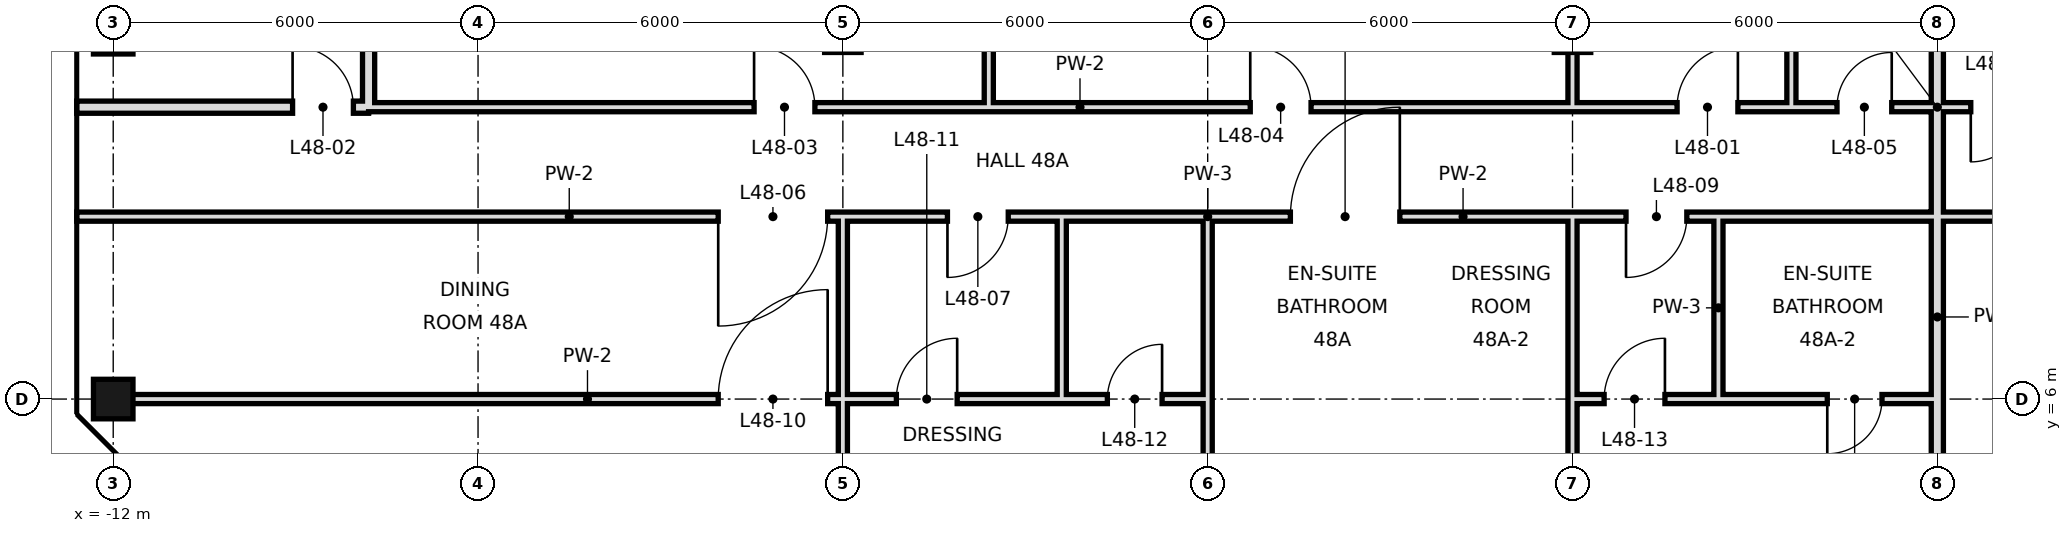
"""IFC4 building model, lengths in metres.
Left out: names, types, materials, properties, quantities, classifications, styles, units other than length and angle.
Written with IfcOpenShell. Run it as: python <this file> out.ifc"""

import sys

from ifc_helpers import new_model, si_unit, direction, frame, frame_2d, origin, origin_2d, place, context, subcontext, project, spatial, rectangle, hollow_rectangle, extrude, element, fill, save


model = new_model("IFC4")
c1 = context("Model", 3, precision=1e-05, world=origin(), true_north=direction((0.0, 1.0)))
c2 = subcontext(c1, "Body", "Model", "MODEL_VIEW")
j1 = project(units=[si_unit("LENGTHUNIT", "METRE"), si_unit("PLANEANGLEUNIT", "RADIAN")], contexts=[c1])
p1 = place(None, origin())
s1 = spatial("IfcSite", under=j1, at=p1, CompositionType="ELEMENT")
p2 = place(p1, origin())
s2 = spatial("IfcBuilding", under=s1, at=p2, CompositionType="ELEMENT")
p3 = place(p2, frame((0.0, 0.0, 206.4)))
s3 = spatial("IfcBuildingStorey", under=s2, at=p3, CompositionType="ELEMENT", Elevation=206.4)
for number, where, z_axis, x_axis in (
    (1, (-12.0, 6.0, 0.0), (0.0, 0.0, 1.0), (1.0, 0.0, 0.0)),
    (2, (-12.0, 12.0, 0.0), (0.0, 0.0, 1.0), (1.0, 0.0, 0.0)),
):
    element("IfcColumn", number, at=place(p3, frame(where, z_axis=z_axis, x_axis=x_axis)), inside=s3, PredefinedType="COLUMN", context=c2, shape_type="SweptSolid", body=[
        extrude(hollow_rectangle(XDim=0.65, YDim=0.65, WallThickness=0.032, at=origin_2d()), origin(), (0.0, 0.0, 1.0), 3.6),
    ])
p4 = place(p3, frame((-7.8, 10.8, 0.0), z_axis=(0.0, 0.0, 1.0), x_axis=(0.0, 1.0, 0.0)))
e3 = element("IfcWall", 3, at=p4, inside=s3, PredefinedType="SOLIDWALL", context=c2, shape_type="SweptSolid", body=[
    extrude(rectangle(XDim=7.2, YDim=0.2, at=frame_2d((3.6, 0.0))), origin(), (0.0, 0.0, 1.0), 2.68),
])
for number, where, z_axis, x_axis in (
    (4, (0.0, 0.0, 0.0), (0.0, 0.0, 1.0), (0.0, 1.0, 0.0)),
    (5, (12.0, 0.0, 0.0), (0.0, 0.0, 1.0), (0.0, 1.0, 0.0)),
):
    element("IfcWall", number, at=place(p3, frame(where, z_axis=z_axis, x_axis=x_axis)), inside=s3, PredefinedType="PARTITIONING", context=c2, shape_type="SweptSolid", body=[
        extrude(rectangle(XDim=9.0, YDim=0.15, at=frame_2d((4.5, 0.0))), origin(), (0.0, 0.0, 1.0), 2.68),
    ])
p5 = place(p3, frame((12.0, 10.8, 0.0), z_axis=(0.0, 0.0, 1.0), x_axis=(0.0, 1.0, 0.0)))
e6 = element("IfcWall", 6, at=p5, inside=s3, PredefinedType="PARTITIONING", context=c2, shape_type="SweptSolid", body=[
    extrude(rectangle(XDim=4.5, YDim=0.15, at=frame_2d((2.25, 0.0))), origin(), (0.0, 0.0, 1.0), 2.68),
])
p6 = place(p3, frame((14.4, 6.0, 0.0), z_axis=(0.0, 0.0, 1.0), x_axis=(0.0, 1.0, 0.0)))
e7 = element("IfcWall", 7, at=p6, inside=s3, PredefinedType="PARTITIONING", context=c2, shape_type="SweptSolid", body=[
    extrude(rectangle(XDim=3.0, YDim=0.15, at=frame_2d((1.5, 0.0))), origin(), (0.0, 0.0, 1.0), 3.38),
])
p7 = place(p3, frame((15.6, 10.8, 0.0), z_axis=(0.0, 0.0, 1.0), x_axis=(0.0, 1.0, 0.0)))
e8 = element("IfcWall", 8, at=p7, inside=s3, PredefinedType="PARTITIONING", context=c2, shape_type="SweptSolid", body=[
    extrude(rectangle(XDim=4.5, YDim=0.15, at=frame_2d((2.25, 0.0))), origin(), (0.0, 0.0, 1.0), 3.38),
])
p8 = place(p3, frame((18.0, -0.6, 0.0), z_axis=(0.0, 0.0, 1.0), x_axis=(0.0, 1.0, 0.0)))
e9 = element("IfcWall", 9, at=p8, inside=s3, PredefinedType="SOLIDWALL", context=c2, shape_type="SweptSolid", body=[
    extrude(rectangle(XDim=15.9, YDim=0.2, at=frame_2d((7.95, 0.0))), origin(), (0.0, 0.0, 1.0), 2.68),
])
p9 = place(p3, frame((2.4, 10.8, 0.0), z_axis=(0.0, 0.0, 1.0), x_axis=(0.0, 1.0, 0.0)))
e10 = element("IfcWall", 10, at=p9, inside=s3, PredefinedType="PARTITIONING", context=c2, shape_type="SweptSolid", body=[
    extrude(rectangle(XDim=7.2, YDim=0.15, at=frame_2d((3.6, 0.0))), origin(), (0.0, 0.0, 1.0), 3.38),
])
p10 = place(p3, frame((3.6, 6.0, 0.0), z_axis=(0.0, 0.0, 1.0), x_axis=(0.0, 1.0, 0.0)))
e11 = element("IfcWall", 11, at=p10, inside=s3, PredefinedType="PARTITIONING", context=c2, shape_type="SweptSolid", body=[
    extrude(rectangle(XDim=3.0, YDim=0.15, at=frame_2d((1.5, 0.0))), origin(), (0.0, 0.0, 1.0), 3.38),
])
p11 = place(p3, frame((6.0, -0.6, 0.0), z_axis=(0.0, 0.0, 1.0), x_axis=(0.0, 1.0, 0.0)))
e12 = element("IfcWall", 12, at=p11, inside=s3, PredefinedType="PARTITIONING", context=c2, shape_type="SweptSolid", body=[
    extrude(rectangle(XDim=6.6, YDim=0.15, at=frame_2d((3.3, 0.0))), origin(), (0.0, 0.0, 1.0), 2.68),
])
p12 = place(p3, frame((6.0, 6.0, 0.0), z_axis=(0.0, 0.0, 1.0), x_axis=(0.0, 1.0, 0.0)))
e13 = element("IfcWall", 13, at=p12, inside=s3, PredefinedType="PARTITIONING", context=c2, shape_type="SweptSolid", body=[
    extrude(rectangle(XDim=3.0, YDim=0.15, at=frame_2d((1.5, 0.0))), origin(), (0.0, 0.0, 1.0), 2.68),
])
p13 = place(p3, frame((-12.6, 10.8, 0.0), z_axis=(0.0, 0.0, 1.0), x_axis=(1.0, 0.0, 0.0)))
e14 = element("IfcWall", 14, at=p13, inside=s3, PredefinedType="SOLIDWALL", context=c2, shape_type="SweptSolid", body=[
    extrude(rectangle(XDim=4.8, YDim=0.2, at=frame_2d((2.4, 0.0))), origin(), (0.0, 0.0, 1.0), 2.93),
])
p14 = place(p13, frame((3.55, 0.0, 0.0)))
e15 = element("IfcOpeningElement", 15, at=p14, cuts=e14, PredefinedType="OPENING", context=c2, shape_type="SweptSolid", body=[
    extrude(rectangle(XDim=1.0, YDim=2.4, at=frame_2d((0.5, 1.2))), frame((0.0, 0.11, 0.0), z_axis=(0.0, -1.0, 0.0), x_axis=(1.0, 0.0, 0.0)), (0.0, 0.0, 1.0), 0.22),
])
p15 = place(p3, frame((-7.8, 10.8, 0.0), z_axis=(0.0, 0.0, 1.0), x_axis=(1.0, 0.0, 0.0)))
e16 = element("IfcWall", 16, at=p15, inside=s3, PredefinedType="PARTITIONING", context=c2, shape_type="SweptSolid", body=[
    extrude(rectangle(XDim=23.4, YDim=0.15, at=frame_2d((11.7, 0.0))), origin(), (0.0, 0.0, 1.0), 3.38),
])
p16 = place(p15, frame((21.52, 0.0, 0.0)))
e17 = element("IfcOpeningElement", 17, at=p16, cuts=e16, PredefinedType="OPENING", context=c2, shape_type="SweptSolid", body=[
    extrude(rectangle(XDim=1.0, YDim=2.4, at=frame_2d((0.5, 1.2))), frame((0.0, 0.085, 0.0), z_axis=(0.0, -1.0, 0.0), x_axis=(1.0, 0.0, 0.0)), (0.0, 0.0, 1.0), 0.17),
])
p17 = place(p15, frame((6.34, 0.0, 0.0)))
e18 = element("IfcOpeningElement", 18, at=p17, cuts=e16, PredefinedType="OPENING", context=c2, shape_type="SweptSolid", body=[
    extrude(rectangle(XDim=1.0, YDim=2.4, at=frame_2d((0.5, 1.2))), frame((0.0, 0.085, 0.0), z_axis=(0.0, -1.0, 0.0), x_axis=(1.0, 0.0, 0.0)), (0.0, 0.0, 1.0), 0.17),
])
p18 = place(p15, frame((14.5, 0.0, 0.0)))
e19 = element("IfcOpeningElement", 19, at=p18, cuts=e16, PredefinedType="OPENING", context=c2, shape_type="SweptSolid", body=[
    extrude(rectangle(XDim=1.0, YDim=2.4, at=frame_2d((0.5, 1.2))), frame((0.0, 0.085, 0.0), z_axis=(0.0, -1.0, 0.0), x_axis=(1.0, 0.0, 0.0)), (0.0, 0.0, 1.0), 0.17),
])
p19 = place(p3, frame((15.6, 10.8, 0.0), z_axis=(0.0, 0.0, 1.0), x_axis=(1.0, 0.0, 0.0)))
e20 = element("IfcWall", 20, at=p19, inside=s3, PredefinedType="PARTITIONING", context=c2, shape_type="SweptSolid", body=[
    extrude(rectangle(XDim=4.8, YDim=0.15, at=frame_2d((2.4, 0.0))), origin(), (0.0, 0.0, 1.0), 3.38),
])
p20 = place(p19, frame((0.75, 0.0, 0.0)))
e21 = element("IfcOpeningElement", 21, at=p20, cuts=e20, PredefinedType="OPENING", context=c2, shape_type="SweptSolid", body=[
    extrude(rectangle(XDim=0.9, YDim=2.4, at=frame_2d((0.45, 1.2))), frame((0.0, 0.085, 0.0), z_axis=(0.0, -1.0, 0.0), x_axis=(1.0, 0.0, 0.0)), (0.0, 0.0, 1.0), 0.17),
])
p21 = place(p19, frame((2.95, 0.0, 0.0)))
e22 = element("IfcOpeningElement", 22, at=p21, cuts=e20, PredefinedType="OPENING", context=c2, shape_type="SweptSolid", body=[
    extrude(rectangle(XDim=0.9, YDim=2.4, at=frame_2d((0.45, 1.2))), frame((0.0, 0.085, 0.0), z_axis=(0.0, -1.0, 0.0), x_axis=(1.0, 0.0, 0.0)), (0.0, 0.0, 1.0), 0.17),
])
p22 = place(p3, frame((-12.0, 6.0, 0.0), z_axis=(0.0, 0.0, 1.0), x_axis=(1.0, 0.0, 0.0)))
e23 = element("IfcWall", 23, at=p22, inside=s3, PredefinedType="PARTITIONING", context=c2, shape_type="SweptSolid", body=[
    extrude(rectangle(XDim=15.6, YDim=0.15, at=frame_2d((7.8, 0.0))), origin(), (0.0, 0.0, 1.0), 2.68),
])
p23 = place(p22, frame((9.95, 0.0, 0.0)))
e24 = element("IfcOpeningElement", 24, at=p23, cuts=e23, PredefinedType="OPENING", context=c2, shape_type="SweptSolid", body=[
    extrude(rectangle(XDim=1.8, YDim=2.4, at=frame_2d((0.9, 1.2))), frame((0.0, 0.085, 0.0), z_axis=(0.0, -1.0, 0.0), x_axis=(1.0, 0.0, 0.0)), (0.0, 0.0, 1.0), 0.17),
])
p24 = place(p22, frame((12.88, 0.0, 0.0)))
e25 = element("IfcOpeningElement", 25, at=p24, cuts=e23, PredefinedType="OPENING", context=c2, shape_type="SweptSolid", body=[
    extrude(rectangle(XDim=1.0, YDim=2.4, at=frame_2d((0.5, 1.2))), frame((0.0, 0.085, 0.0), z_axis=(0.0, -1.0, 0.0), x_axis=(1.0, 0.0, 0.0)), (0.0, 0.0, 1.0), 0.17),
])
p25 = place(p3, frame((12.0, 6.0, 0.0), z_axis=(0.0, 0.0, 1.0), x_axis=(1.0, 0.0, 0.0)))
e26 = element("IfcWall", 26, at=p25, inside=s3, PredefinedType="PARTITIONING", context=c2, shape_type="SweptSolid", body=[
    extrude(rectangle(XDim=2.4, YDim=0.15, at=frame_2d((1.2, 0.0))), origin(), (0.0, 0.0, 1.0), 2.93),
])
p26 = place(p25, frame((0.52, 0.0, 0.0)))
e27 = element("IfcOpeningElement", 27, at=p26, cuts=e26, PredefinedType="OPENING", context=c2, shape_type="SweptSolid", body=[
    extrude(rectangle(XDim=1.0, YDim=2.4, at=frame_2d((0.5, 1.2))), frame((0.0, 0.085, 0.0), z_axis=(0.0, -1.0, 0.0), x_axis=(1.0, 0.0, 0.0)), (0.0, 0.0, 1.0), 0.17),
])
p27 = place(p3, frame((3.6, 6.0, 0.0), z_axis=(0.0, 0.0, 1.0), x_axis=(1.0, 0.0, 0.0)))
e28 = element("IfcWall", 28, at=p27, inside=s3, PredefinedType="PARTITIONING", context=c2, shape_type="SweptSolid", body=[
    extrude(rectangle(XDim=2.4, YDim=0.15, at=frame_2d((1.2, 0.0))), origin(), (0.0, 0.0, 1.0), 2.93),
])
p28 = place(p27, frame((0.75, 0.0, 0.0)))
e29 = element("IfcOpeningElement", 29, at=p28, cuts=e28, PredefinedType="OPENING", context=c2, shape_type="SweptSolid", body=[
    extrude(rectangle(XDim=0.9, YDim=2.4, at=frame_2d((0.45, 1.2))), frame((0.0, 0.085, 0.0), z_axis=(0.0, -1.0, 0.0), x_axis=(1.0, 0.0, 0.0)), (0.0, 0.0, 1.0), 0.17),
])
p29 = place(p3, frame((14.4, 6.0, 0.0), z_axis=(0.0, 0.0, 1.0), x_axis=(1.0, 0.0, 0.0)))
e30 = element("IfcWall", 30, at=p29, inside=s3, PredefinedType="PARTITIONING", context=c2, shape_type="SweptSolid", body=[
    extrude(rectangle(XDim=3.6, YDim=0.15, at=frame_2d((1.8, 0.0))), origin(), (0.0, 0.0, 1.0), 2.93),
])
p30 = place(p29, frame((1.79, 0.0, 0.0)))
e31 = element("IfcOpeningElement", 31, at=p30, cuts=e30, PredefinedType="OPENING", context=c2, shape_type="SweptSolid", body=[
    extrude(rectangle(XDim=0.9, YDim=2.4, at=frame_2d((0.45, 1.2))), frame((0.0, 0.085, 0.0), z_axis=(0.0, -1.0, 0.0), x_axis=(1.0, 0.0, 0.0)), (0.0, 0.0, 1.0), 0.17),
])
p31 = place(p3, frame((-12.6, 9.0, 0.0), z_axis=(0.0, 0.0, 1.0), x_axis=(1.0, 0.0, 0.0)))
e32 = element("IfcWall", 32, at=p31, inside=s3, PredefinedType="PARTITIONING", context=c2, shape_type="SweptSolid", body=[
    extrude(rectangle(XDim=16.2, YDim=0.15, at=frame_2d((8.1, 0.0))), origin(), (0.0, 0.0, 1.0), 3.38),
])
p32 = place(p31, frame((10.55, 0.0, 0.0)))
e33 = element("IfcOpeningElement", 33, at=p32, cuts=e32, PredefinedType="OPENING", context=c2, shape_type="SweptSolid", body=[
    extrude(rectangle(XDim=1.8, YDim=2.4, at=frame_2d((0.9, 1.2))), frame((0.0, 0.085, 0.0), z_axis=(0.0, -1.0, 0.0), x_axis=(1.0, 0.0, 0.0)), (0.0, 0.0, 1.0), 0.17),
])
p33 = place(p31, frame((14.32, 0.0, 0.0)))
e34 = element("IfcOpeningElement", 34, at=p33, cuts=e32, PredefinedType="OPENING", context=c2, shape_type="SweptSolid", body=[
    extrude(rectangle(XDim=1.0, YDim=2.4, at=frame_2d((0.5, 1.2))), frame((0.0, 0.085, 0.0), z_axis=(0.0, -1.0, 0.0), x_axis=(1.0, 0.0, 0.0)), (0.0, 0.0, 1.0), 0.17),
])
p34 = place(p3, frame((6.0, 9.0, 0.0), z_axis=(0.0, 0.0, 1.0), x_axis=(1.0, 0.0, 0.0)))
e35 = element("IfcWall", 35, at=p34, inside=s3, PredefinedType="PARTITIONING", context=c2, shape_type="SweptSolid", body=[
    extrude(rectangle(XDim=8.4, YDim=0.15, at=frame_2d((4.2, 0.0))), origin(), (0.0, 0.0, 1.0), 3.38),
])
p35 = place(p34, frame((1.36, 0.0, 0.0)))
e36 = element("IfcOpeningElement", 36, at=p35, cuts=e35, PredefinedType="OPENING", context=c2, shape_type="SweptSolid", body=[
    extrude(rectangle(XDim=1.8, YDim=2.4, at=frame_2d((0.9, 1.2))), frame((0.0, 0.085, 0.0), z_axis=(0.0, -1.0, 0.0), x_axis=(1.0, 0.0, 0.0)), (0.0, 0.0, 1.0), 0.17),
])
p36 = place(p34, frame((6.88, 0.0, 0.0)))
e37 = element("IfcOpeningElement", 37, at=p36, cuts=e35, PredefinedType="OPENING", context=c2, shape_type="SweptSolid", body=[
    extrude(rectangle(XDim=1.0, YDim=2.4, at=frame_2d((0.5, 1.2))), frame((0.0, 0.085, 0.0), z_axis=(0.0, -1.0, 0.0), x_axis=(1.0, 0.0, 0.0)), (0.0, 0.0, 1.0), 0.17),
])
p37 = place(p3, frame((18.0, 9.0, 0.0), z_axis=(0.0, 0.0, 1.0), x_axis=(1.0, 0.0, 0.0)))
e38 = element("IfcWall", 38, at=p37, inside=s3, PredefinedType="PARTITIONING", context=c2, shape_type="SweptSolid", body=[
    extrude(rectangle(XDim=15.6, YDim=0.15, at=frame_2d((7.8, 0.0))), origin(), (0.0, 0.0, 1.0), 3.38),
])
p38 = place(p37, frame((2.5, 0.0, 0.0)))
e39 = element("IfcOpeningElement", 39, at=p38, cuts=e38, PredefinedType="OPENING", context=c2, shape_type="SweptSolid", body=[
    extrude(rectangle(XDim=1.0, YDim=2.4, at=frame_2d((0.5, 1.2))), frame((0.0, 0.085, 0.0), z_axis=(0.0, -1.0, 0.0), x_axis=(1.0, 0.0, 0.0)), (0.0, 0.0, 1.0), 0.17),
])
p39 = place(p37, frame((8.84, 0.0, 0.0)))
e40 = element("IfcOpeningElement", 40, at=p39, cuts=e38, PredefinedType="OPENING", context=c2, shape_type="SweptSolid", body=[
    extrude(rectangle(XDim=1.8, YDim=2.4, at=frame_2d((0.9, 1.2))), frame((0.0, 0.085, 0.0), z_axis=(0.0, -1.0, 0.0), x_axis=(1.0, 0.0, 0.0)), (0.0, 0.0, 1.0), 0.17),
])
p40 = place(p37, frame((13.3, 0.0, 0.0)))
e41 = element("IfcOpeningElement", 41, at=p40, cuts=e38, PredefinedType="OPENING", context=c2, shape_type="SweptSolid", body=[
    extrude(rectangle(XDim=1.0, YDim=2.4, at=frame_2d((0.5, 1.2))), frame((0.0, 0.085, 0.0), z_axis=(0.0, -1.0, 0.0), x_axis=(1.0, 0.0, 0.0)), (0.0, 0.0, 1.0), 0.17),
])
p41 = place(p3, frame((3.6, 9.0, 0.0), z_axis=(0.0, 0.0, 1.0), x_axis=(1.0, 0.0, 0.0)))
e42 = element("IfcWall", 42, at=p41, inside=s3, PredefinedType="PARTITIONING", context=c2, shape_type="SweptSolid", body=[
    extrude(rectangle(XDim=2.4, YDim=0.15, at=frame_2d((1.2, 0.0))), origin(), (0.0, 0.0, 1.0), 3.38),
])
p42 = place(p3, frame((14.4, 9.0, 0.0), z_axis=(0.0, 0.0, 1.0), x_axis=(1.0, 0.0, 0.0)))
e43 = element("IfcWall", 43, at=p42, inside=s3, PredefinedType="PARTITIONING", context=c2, shape_type="SweptSolid", body=[
    extrude(rectangle(XDim=3.6, YDim=0.15, at=frame_2d((1.8, 0.0))), origin(), (0.0, 0.0, 1.0), 3.38),
])
p43 = place(p16, frame((1.0, 0.0, 0.0), z_axis=(0.0, 0.0, 1.0), x_axis=(-1.0, 0.0, 0.0)))
e44 = element("IfcDoor", 44, at=p43, inside=s3, OperationType="SINGLE_SWING_LEFT", PredefinedType="DOOR", context=c2, shape_type="SweptSolid", body=[
    extrude(rectangle(XDim=1.0, YDim=2.4, at=frame_2d((0.5, 1.2))), frame((0.0, 0.025, 0.0), z_axis=(0.0, -1.0, 0.0), x_axis=(1.0, 0.0, 0.0)), (0.0, 0.0, 1.0), 0.05),
])
fill(e17, e44)
p44 = place(p14, origin())
e45 = element("IfcDoor", 45, at=p44, inside=s3, OperationType="SINGLE_SWING_LEFT", PredefinedType="DOOR", context=c2, shape_type="SweptSolid", body=[
    extrude(rectangle(XDim=1.0, YDim=2.4, at=frame_2d((0.5, 1.2))), frame((0.0, 0.025, 0.0), z_axis=(0.0, -1.0, 0.0), x_axis=(1.0, 0.0, 0.0)), (0.0, 0.0, 1.0), 0.05),
])
fill(e15, e45)
p45 = place(p17, origin())
e46 = element("IfcDoor", 46, at=p45, inside=s3, OperationType="SINGLE_SWING_LEFT", PredefinedType="DOOR", context=c2, shape_type="SweptSolid", body=[
    extrude(rectangle(XDim=1.0, YDim=2.4, at=frame_2d((0.5, 1.2))), frame((0.0, 0.025, 0.0), z_axis=(0.0, -1.0, 0.0), x_axis=(1.0, 0.0, 0.0)), (0.0, 0.0, 1.0), 0.05),
])
fill(e18, e46)
p46 = place(p18, origin())
e47 = element("IfcDoor", 47, at=p46, inside=s3, OperationType="SINGLE_SWING_LEFT", PredefinedType="DOOR", context=c2, shape_type="SweptSolid", body=[
    extrude(rectangle(XDim=1.0, YDim=2.4, at=frame_2d((0.5, 1.2))), frame((0.0, 0.025, 0.0), z_axis=(0.0, -1.0, 0.0), x_axis=(1.0, 0.0, 0.0)), (0.0, 0.0, 1.0), 0.05),
])
fill(e19, e47)
p47 = place(p20, frame((0.9, 0.0, 0.0), z_axis=(0.0, 0.0, 1.0), x_axis=(-1.0, 0.0, 0.0)))
e48 = element("IfcDoor", 48, at=p47, inside=s3, OperationType="SINGLE_SWING_LEFT", PredefinedType="DOOR", context=c2, shape_type="SweptSolid", body=[
    extrude(rectangle(XDim=0.9, YDim=2.4, at=frame_2d((0.45, 1.2))), frame((0.0, 0.025, 0.0), z_axis=(0.0, -1.0, 0.0), x_axis=(1.0, 0.0, 0.0)), (0.0, 0.0, 1.0), 0.05),
])
fill(e21, e48)
p48 = place(p32, frame((1.8, 0.0, 0.0), z_axis=(0.0, 0.0, 1.0), x_axis=(-1.0, 0.0, 0.0)))
e49 = element("IfcDoor", 49, at=p48, inside=s3, OperationType="SINGLE_SWING_RIGHT", PredefinedType="DOOR", context=c2, shape_type="SweptSolid", body=[
    extrude(rectangle(XDim=1.8, YDim=2.4, at=frame_2d((0.9, 1.2))), frame((0.0, 0.025, 0.0), z_axis=(0.0, -1.0, 0.0), x_axis=(1.0, 0.0, 0.0)), (0.0, 0.0, 1.0), 0.05),
])
fill(e33, e49)
p49 = place(p33, frame((1.0, 0.0, 0.0), z_axis=(0.0, 0.0, 1.0), x_axis=(-1.0, 0.0, 0.0)))
e50 = element("IfcDoor", 50, at=p49, inside=s3, OperationType="SINGLE_SWING_RIGHT", PredefinedType="DOOR", context=c2, shape_type="SweptSolid", body=[
    extrude(rectangle(XDim=1.0, YDim=2.4, at=frame_2d((0.5, 1.2))), frame((0.0, 0.025, 0.0), z_axis=(0.0, -1.0, 0.0), x_axis=(1.0, 0.0, 0.0)), (0.0, 0.0, 1.0), 0.05),
])
fill(e34, e50)
p50 = place(p35, frame((1.8, 0.0, 0.0), z_axis=(0.0, 0.0, 1.0), x_axis=(-1.0, 0.0, 0.0)))
e51 = element("IfcDoor", 51, at=p50, inside=s3, OperationType="SINGLE_SWING_LEFT", PredefinedType="DOOR", context=c2, shape_type="SweptSolid", body=[
    extrude(rectangle(XDim=1.8, YDim=2.4, at=frame_2d((0.9, 1.2))), frame((0.0, 0.025, 0.0), z_axis=(0.0, -1.0, 0.0), x_axis=(1.0, 0.0, 0.0)), (0.0, 0.0, 1.0), 0.05),
])
fill(e36, e51)
p51 = place(p36, frame((1.0, 0.0, 0.0), z_axis=(0.0, 0.0, 1.0), x_axis=(-1.0, 0.0, 0.0)))
e52 = element("IfcDoor", 52, at=p51, inside=s3, OperationType="SINGLE_SWING_RIGHT", PredefinedType="DOOR", context=c2, shape_type="SweptSolid", body=[
    extrude(rectangle(XDim=1.0, YDim=2.4, at=frame_2d((0.5, 1.2))), frame((0.0, 0.025, 0.0), z_axis=(0.0, -1.0, 0.0), x_axis=(1.0, 0.0, 0.0)), (0.0, 0.0, 1.0), 0.05),
])
fill(e37, e52)
p52 = place(p23, frame((1.8, 0.0, 0.0), z_axis=(0.0, 0.0, 1.0), x_axis=(-1.0, 0.0, 0.0)))
e53 = element("IfcDoor", 53, at=p52, inside=s3, OperationType="SINGLE_SWING_LEFT", PredefinedType="DOOR", context=c2, shape_type="SweptSolid", body=[
    extrude(rectangle(XDim=1.8, YDim=2.4, at=frame_2d((0.9, 1.2))), frame((0.0, 0.025, 0.0), z_axis=(0.0, -1.0, 0.0), x_axis=(1.0, 0.0, 0.0)), (0.0, 0.0, 1.0), 0.05),
])
fill(e24, e53)
p53 = place(p24, frame((1.0, 0.0, 0.0), z_axis=(0.0, 0.0, 1.0), x_axis=(-1.0, 0.0, 0.0)))
e54 = element("IfcDoor", 54, at=p53, inside=s3, OperationType="SINGLE_SWING_LEFT", PredefinedType="DOOR", context=c2, shape_type="SweptSolid", body=[
    extrude(rectangle(XDim=1.0, YDim=2.4, at=frame_2d((0.5, 1.2))), frame((0.0, 0.025, 0.0), z_axis=(0.0, -1.0, 0.0), x_axis=(1.0, 0.0, 0.0)), (0.0, 0.0, 1.0), 0.05),
])
fill(e25, e54)
p54 = place(p28, frame((0.9, 0.0, 0.0), z_axis=(0.0, 0.0, 1.0), x_axis=(-1.0, 0.0, 0.0)))
e55 = element("IfcDoor", 55, at=p54, inside=s3, OperationType="SINGLE_SWING_LEFT", PredefinedType="DOOR", context=c2, shape_type="SweptSolid", body=[
    extrude(rectangle(XDim=0.9, YDim=2.4, at=frame_2d((0.45, 1.2))), frame((0.0, 0.025, 0.0), z_axis=(0.0, -1.0, 0.0), x_axis=(1.0, 0.0, 0.0)), (0.0, 0.0, 1.0), 0.05),
])
fill(e29, e55)
p55 = place(p26, frame((1.0, 0.0, 0.0), z_axis=(0.0, 0.0, 1.0), x_axis=(-1.0, 0.0, 0.0)))
e56 = element("IfcDoor", 56, at=p55, inside=s3, OperationType="SINGLE_SWING_LEFT", PredefinedType="DOOR", context=c2, shape_type="SweptSolid", body=[
    extrude(rectangle(XDim=1.0, YDim=2.4, at=frame_2d((0.5, 1.2))), frame((0.0, 0.025, 0.0), z_axis=(0.0, -1.0, 0.0), x_axis=(1.0, 0.0, 0.0)), (0.0, 0.0, 1.0), 0.05),
])
fill(e27, e56)
p56 = place(p30, frame((0.9, 0.0, 0.0), z_axis=(0.0, 0.0, 1.0), x_axis=(-1.0, 0.0, 0.0)))
e57 = element("IfcDoor", 57, at=p56, inside=s3, OperationType="SINGLE_SWING_RIGHT", PredefinedType="DOOR", context=c2, shape_type="SweptSolid", body=[
    extrude(rectangle(XDim=0.9, YDim=2.4, at=frame_2d((0.45, 1.2))), frame((0.0, 0.025, 0.0), z_axis=(0.0, -1.0, 0.0), x_axis=(1.0, 0.0, 0.0)), (0.0, 0.0, 1.0), 0.05),
])
fill(e31, e57)
p57 = place(p21, frame((0.9, 0.0, 0.0), z_axis=(0.0, 0.0, 1.0), x_axis=(-1.0, 0.0, 0.0)))
e58 = element("IfcDoor", 58, at=p57, inside=s3, OperationType="SINGLE_SWING_RIGHT", PredefinedType="DOOR", context=c2, shape_type="SweptSolid", body=[
    extrude(rectangle(XDim=0.9, YDim=2.4, at=frame_2d((0.45, 1.2))), frame((0.0, 0.025, 0.0), z_axis=(0.0, -1.0, 0.0), x_axis=(1.0, 0.0, 0.0)), (0.0, 0.0, 1.0), 0.05),
])
fill(e22, e58)
save(model, sys.argv[1])
